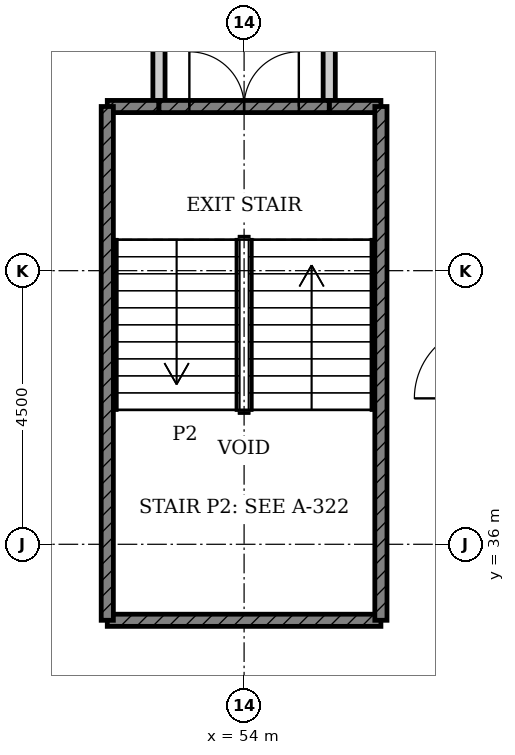
"""IFC4 building model, lengths in metres.
Left out: names, types, materials, properties, quantities, classifications, styles, units other than length and angle.
Written with IfcOpenShell. Run it as: python <this file> out.ifc"""

import sys

from ifc_helpers import new_model, si_unit, direction, frame, frame_2d, origin, place, context, subcontext, project, spatial, rectangle, extrude, element, fill, save


model = new_model("IFC4")
c1 = context("Model", 3, precision=1e-05, world=origin(), true_north=direction((0.0, 1.0)))
c2 = subcontext(c1, "Body", "Model", "MODEL_VIEW")
j1 = project(units=[si_unit("LENGTHUNIT", "METRE"), si_unit("PLANEANGLEUNIT", "RADIAN")], contexts=[c1])
p1 = place(None, origin())
s1 = spatial("IfcSite", under=j1, at=p1, CompositionType="ELEMENT")
p2 = place(p1, origin())
s2 = spatial("IfcBuilding", under=s1, at=p2, CompositionType="ELEMENT")
p3 = place(p2, frame((0.0, 0.0, 17.4)))
s3 = spatial("IfcBuildingStorey", under=s2, at=p3, CompositionType="ELEMENT", Elevation=17.4)
p4 = place(p3, frame((52.6, 43.2, 0.0), z_axis=(0.0, 0.0, 1.0), x_axis=(0.0, 1.0, 0.0)))
e1 = element("IfcWall", 1, at=p4, inside=s3, PredefinedType="PARTITIONING", context=c2, shape_type="SweptSolid", body=[
    extrude(rectangle(XDim=1.8, YDim=0.2, at=frame_2d((0.9, 0.0))), origin(), (0.0, 0.0, 1.0), 6.25),
])
p5 = place(p3, frame((55.4, 43.2, 0.0), z_axis=(0.0, 0.0, 1.0), x_axis=(0.0, 1.0, 0.0)))
e2 = element("IfcWall", 2, at=p5, inside=s3, PredefinedType="PARTITIONING", context=c2, shape_type="SweptSolid", body=[
    extrude(rectangle(XDim=10.92, YDim=0.2, at=frame_2d((5.46, 0.0))), origin(), (0.0, 0.0, 1.0), 6.25),
])
p6 = place(p5, frame((4.8, 0.0, 0.0)))
e3 = element("IfcOpeningElement", 3, at=p6, cuts=e2, PredefinedType="OPENING", context=c2, shape_type="SweptSolid", body=[
    extrude(rectangle(XDim=1.2, YDim=2.1, at=frame_2d((0.6, 1.05))), frame((0.0, 0.11, 0.0), z_axis=(0.0, -1.0, 0.0), x_axis=(1.0, 0.0, 0.0)), (0.0, 0.0, 1.0), 0.22),
])
p7 = place(p3, frame((51.75, 34.75, 0.0), z_axis=(0.0, 0.0, 1.0), x_axis=(1.0, 0.0, 0.0)))
e4 = element("IfcWall", 4, at=p7, inside=s3, PredefinedType="SHEAR", context=c2, shape_type="SweptSolid", body=[
    extrude(rectangle(XDim=4.5, YDim=0.2, at=frame_2d((2.25, 0.0))), origin(), (0.0, 0.0, 1.0), 6.25),
])
for number, where, z_axis, x_axis in (
    (5, (51.75, 43.2, 0.0), (0.0, 0.0, 1.0), (1.0, 0.0, 0.0)),
    (6, (55.4, 43.2, 0.0), (0.0, 0.0, 1.0), (1.0, 0.0, 0.0)),
):
    element("IfcWall", number, at=place(p3, frame(where, z_axis=z_axis, x_axis=x_axis)), inside=s3, PredefinedType="SHEAR", context=c2, shape_type="SweptSolid", body=[
        extrude(rectangle(XDim=0.85, YDim=0.2, at=frame_2d((0.425, 0.0))), origin(), (0.0, 0.0, 1.0), 6.25),
    ])
p8 = place(p3, frame((52.6, 43.2, 0.0), z_axis=(0.0, 0.0, 1.0), x_axis=(1.0, 0.0, 0.0)))
e7 = element("IfcWall", 7, at=p8, inside=s3, PredefinedType="SHEAR", context=c2, shape_type="SweptSolid", body=[
    extrude(rectangle(XDim=2.8, YDim=0.2, at=frame_2d((1.4, 0.0))), origin(), (0.0, 0.0, 1.0), 6.25),
])
p9 = place(p8, frame((0.5, 0.0, 0.0)))
e8 = element("IfcOpeningElement", 8, at=p9, cuts=e7, PredefinedType="OPENING", context=c2, shape_type="SweptSolid", body=[
    extrude(rectangle(XDim=1.8, YDim=2.1, at=frame_2d((0.9, 1.05))), frame((0.0, 0.11, 0.0), z_axis=(0.0, -1.0, 0.0), x_axis=(1.0, 0.0, 0.0)), (0.0, 0.0, 1.0), 0.22),
])
for number, where, z_axis, x_axis in (
    (9, (51.75, 34.75, 0.0), (0.0, 0.0, 1.0), (0.0, 1.0, 0.0)),
    (10, (56.25, 34.75, 0.0), (0.0, 0.0, 1.0), (0.0, 1.0, 0.0)),
):
    element("IfcWall", number, at=place(p3, frame(where, z_axis=z_axis, x_axis=x_axis)), inside=s3, PredefinedType="SHEAR", context=c2, shape_type="SweptSolid", body=[
        extrude(rectangle(XDim=8.45, YDim=0.2, at=frame_2d((4.225, 0.0))), origin(), (0.0, 0.0, 1.0), 6.25),
    ])
p10 = place(p9, origin())
e11 = element("IfcDoor", 11, at=p10, inside=s3, OperationType="DOUBLE_DOOR_SINGLE_SWING", PredefinedType="DOOR", context=c2, shape_type="SweptSolid", body=[
    extrude(rectangle(XDim=1.8, YDim=2.1, at=frame_2d((0.9, 1.05))), frame((0.0, 0.025, 0.0), z_axis=(0.0, -1.0, 0.0), x_axis=(1.0, 0.0, 0.0)), (0.0, 0.0, 1.0), 0.05),
])
fill(e8, e11)
save(model, sys.argv[1])
